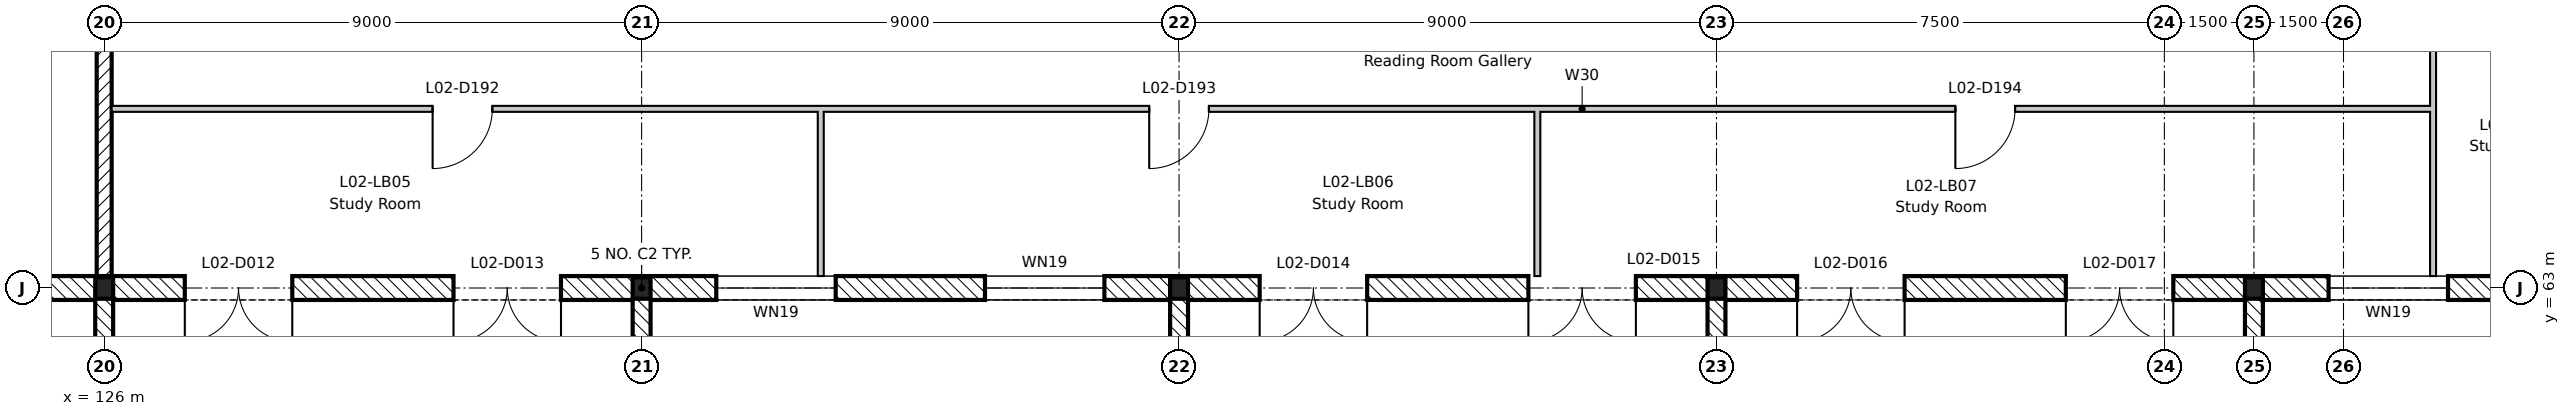
"""IFC4 building model, lengths in metres.
Left out: names, types, materials, properties, quantities, classifications, styles, units other than length and angle.
Written with IfcOpenShell. Run it as: python <this file> out.ifc"""

import sys

from ifc_helpers import new_model, si_unit, direction, frame, frame_2d, origin, origin_2d, place, context, subcontext, project, spatial, rectangle, i_section, extrude, element, fill, save


model = new_model("IFC4")
c1 = context("Model", 3, precision=1e-05, world=origin(), true_north=direction((0.0, 1.0)))
c2 = subcontext(c1, "Body", "Model", "MODEL_VIEW")
j1 = project(units=[si_unit("LENGTHUNIT", "METRE"), si_unit("PLANEANGLEUNIT", "RADIAN")], contexts=[c1])
p1 = place(None, origin())
s1 = spatial("IfcSite", under=j1, at=p1, CompositionType="ELEMENT")
p2 = place(p1, origin())
s2 = spatial("IfcBuilding", under=s1, at=p2, CompositionType="ELEMENT")
p3 = place(p2, frame((0.0, 0.0, 9.9)))
s3 = spatial("IfcBuildingStorey", under=s2, at=p3, CompositionType="ELEMENT", Elevation=9.9)
for number, where, z_axis, x_axis in (
    (1, (126.0, 63.0, -0.2), (0.0, 0.0, 1.0), (1.0, 0.0, 0.0)),
    (2, (135.0, 63.0, -0.2), (0.0, 0.0, 1.0), (1.0, 0.0, 0.0)),
    (3, (144.0, 63.0, -0.2), (0.0, 0.0, 1.0), (1.0, 0.0, 0.0)),
    (4, (153.0, 63.0, -0.2), (0.0, 0.0, 1.0), (1.0, 0.0, 0.0)),
    (5, (162.0, 63.0, -0.2), (0.0, 0.0, 1.0), (1.0, 0.0, 0.0)),
):
    element("IfcColumn", number, at=place(p3, frame(where, z_axis=z_axis, x_axis=x_axis)), inside=s3, PredefinedType="COLUMN", context=c2, shape_type="SweptSolid", body=[
        extrude(i_section(OverallWidth=0.3, OverallDepth=0.36, WebThickness=0.012, FlangeThickness=0.022, FilletRadius=0.027, at=origin_2d()), origin(), (0.0, 0.0, 1.0), 4.45),
    ])
p4 = place(p3, frame((126.0, 63.2, 0.0), z_axis=(0.0, 0.0, 1.0), x_axis=(0.0, 1.0, 0.0)))
e6 = element("IfcWall", 6, at=p4, inside=s3, PredefinedType="SHEAR", context=c2, shape_type="SweptSolid", body=[
    extrude(rectangle(XDim=8.65, YDim=0.25, at=frame_2d((4.325, 0.0))), origin(), (0.0, 0.0, 1.0), 4.25),
])
p5 = place(p4, frame((6.7, 0.0, 0.0)))
e7 = element("IfcOpeningElement", 7, at=p5, cuts=e6, PredefinedType="OPENING", context=c2, shape_type="SweptSolid", body=[
    extrude(rectangle(XDim=1.2, YDim=2.1, at=frame_2d((0.6, 1.05))), frame((0.0, 0.135, 0.0), z_axis=(0.0, -1.0, 0.0), x_axis=(1.0, 0.0, 0.0)), (0.0, 0.0, 1.0), 0.27),
])
for number, where, z_axis, x_axis in (
    (8, (126.0, 62.82, 0.0), (0.0, 0.0, 1.0), (0.0, -1.0, 0.0)),
    (9, (135.0, 62.82, 0.0), (0.0, 0.0, 1.0), (0.0, -1.0, 0.0)),
    (10, (144.0, 62.82, 0.0), (0.0, 0.0, 1.0), (0.0, -1.0, 0.0)),
    (11, (153.0, 62.82, 0.0), (0.0, 0.0, 1.0), (0.0, -1.0, 0.0)),
    (12, (162.0, 62.82, 0.0), (0.0, 0.0, 1.0), (0.0, -1.0, 0.0)),
):
    element("IfcWall", number, at=place(p3, frame(where, z_axis=z_axis, x_axis=x_axis)), inside=s3, PredefinedType="STANDARD", context=c2, shape_type="SweptSolid", body=[
        extrude(rectangle(XDim=2.82, YDim=0.3, at=frame_2d((1.41, 0.0))), origin(), (0.0, 0.0, 1.0), 3.97),
    ])
p6 = place(p3, frame((116.8, 63.0, 0.0), z_axis=(0.0, 0.0, 1.0), x_axis=(1.0, 0.0, 0.0)))
e13 = element("IfcWall", 13, at=p6, inside=s3, PredefinedType="STANDARD", context=c2, shape_type="SweptSolid", body=[
    extrude(rectangle(XDim=54.4, YDim=0.4, at=frame_2d((27.2, 0.0))), origin(), (0.0, 0.0, 1.0), 4.25),
])
p7 = place(p6, frame((19.45, 0.0, 0.5)))
e14 = element("IfcOpeningElement", 14, at=p7, cuts=e13, PredefinedType="OPENING", context=c2, shape_type="SweptSolid", body=[
    extrude(rectangle(XDim=2.0, YDim=3.2, at=frame_2d((1.0, 1.6))), frame((0.0, 0.21, 0.0), z_axis=(0.0, -1.0, 0.0), x_axis=(1.0, 0.0, 0.0)), (0.0, 0.0, 1.0), 0.42),
])
p8 = place(p6, frame((23.95, 0.0, 0.5)))
e15 = element("IfcOpeningElement", 15, at=p8, cuts=e13, PredefinedType="OPENING", context=c2, shape_type="SweptSolid", body=[
    extrude(rectangle(XDim=2.0, YDim=3.2, at=frame_2d((1.0, 1.6))), frame((0.0, 0.21, 0.0), z_axis=(0.0, -1.0, 0.0), x_axis=(1.0, 0.0, 0.0)), (0.0, 0.0, 1.0), 0.42),
])
p9 = place(p6, frame((46.45, 0.0, 0.5)))
e16 = element("IfcOpeningElement", 16, at=p9, cuts=e13, PredefinedType="OPENING", context=c2, shape_type="SweptSolid", body=[
    extrude(rectangle(XDim=2.0, YDim=3.2, at=frame_2d((1.0, 1.6))), frame((0.0, 0.21, 0.0), z_axis=(0.0, -1.0, 0.0), x_axis=(1.0, 0.0, 0.0)), (0.0, 0.0, 1.0), 0.42),
])
p10 = place(p6, frame((50.95, 0.0, 0.5)))
e17 = element("IfcOpeningElement", 17, at=p10, cuts=e13, PredefinedType="OPENING", context=c2, shape_type="SweptSolid", body=[
    extrude(rectangle(XDim=2.0, YDim=3.2, at=frame_2d((1.0, 1.6))), frame((0.0, 0.21, 0.0), z_axis=(0.0, -1.0, 0.0), x_axis=(1.0, 0.0, 0.0)), (0.0, 0.0, 1.0), 0.42),
])
p11 = place(p6, frame((10.55, 0.0, 0.0)))
e18 = element("IfcOpeningElement", 18, at=p11, cuts=e13, PredefinedType="OPENING", context=c2, shape_type="SweptSolid", body=[
    extrude(rectangle(XDim=1.8, YDim=2.4, at=frame_2d((0.9, 1.2))), frame((0.0, 0.21, 0.0), z_axis=(0.0, -1.0, 0.0), x_axis=(1.0, 0.0, 0.0)), (0.0, 0.0, 1.0), 0.42),
])
p12 = place(p6, frame((15.05, 0.0, 0.0)))
e19 = element("IfcOpeningElement", 19, at=p12, cuts=e13, PredefinedType="OPENING", context=c2, shape_type="SweptSolid", body=[
    extrude(rectangle(XDim=1.8, YDim=2.4, at=frame_2d((0.9, 1.2))), frame((0.0, 0.21, 0.0), z_axis=(0.0, -1.0, 0.0), x_axis=(1.0, 0.0, 0.0)), (0.0, 0.0, 1.0), 0.42),
])
p13 = place(p6, frame((28.55, 0.0, 0.0)))
e20 = element("IfcOpeningElement", 20, at=p13, cuts=e13, PredefinedType="OPENING", context=c2, shape_type="SweptSolid", body=[
    extrude(rectangle(XDim=1.8, YDim=2.4, at=frame_2d((0.9, 1.2))), frame((0.0, 0.21, 0.0), z_axis=(0.0, -1.0, 0.0), x_axis=(1.0, 0.0, 0.0)), (0.0, 0.0, 1.0), 0.42),
])
p14 = place(p6, frame((33.05, 0.0, 0.0)))
e21 = element("IfcOpeningElement", 21, at=p14, cuts=e13, PredefinedType="OPENING", context=c2, shape_type="SweptSolid", body=[
    extrude(rectangle(XDim=1.8, YDim=2.4, at=frame_2d((0.9, 1.2))), frame((0.0, 0.21, 0.0), z_axis=(0.0, -1.0, 0.0), x_axis=(1.0, 0.0, 0.0)), (0.0, 0.0, 1.0), 0.42),
])
p15 = place(p6, frame((37.55, 0.0, 0.0)))
e22 = element("IfcOpeningElement", 22, at=p15, cuts=e13, PredefinedType="OPENING", context=c2, shape_type="SweptSolid", body=[
    extrude(rectangle(XDim=1.8, YDim=2.4, at=frame_2d((0.9, 1.2))), frame((0.0, 0.21, 0.0), z_axis=(0.0, -1.0, 0.0), x_axis=(1.0, 0.0, 0.0)), (0.0, 0.0, 1.0), 0.42),
])
p16 = place(p6, frame((42.05, 0.0, 0.0)))
e23 = element("IfcOpeningElement", 23, at=p16, cuts=e13, PredefinedType="OPENING", context=c2, shape_type="SweptSolid", body=[
    extrude(rectangle(XDim=1.8, YDim=2.4, at=frame_2d((0.9, 1.2))), frame((0.0, 0.21, 0.0), z_axis=(0.0, -1.0, 0.0), x_axis=(1.0, 0.0, 0.0)), (0.0, 0.0, 1.0), 0.42),
])
p17 = place(p3, frame((126.125, 66.0, 0.0), z_axis=(0.0, 0.0, 1.0), x_axis=(1.0, 0.0, 0.0)))
e24 = element("IfcWall", 24, at=p17, inside=s3, PredefinedType="PARTITIONING", context=c2, shape_type="SweptSolid", body=[
    extrude(rectangle(XDim=38.825, YDim=0.1, at=frame_2d((19.413, 0.0))), origin(), (0.0, 0.0, 1.0), 4.25),
])
p18 = place(p17, frame((5.375, 0.0, 0.0)))
e25 = element("IfcOpeningElement", 25, at=p18, cuts=e24, PredefinedType="OPENING", context=c2, shape_type="SweptSolid", body=[
    extrude(rectangle(XDim=1.0, YDim=2.1, at=frame_2d((0.5, 1.05))), frame((0.0, 0.06, 0.0), z_axis=(0.0, -1.0, 0.0), x_axis=(1.0, 0.0, 0.0)), (0.0, 0.0, 1.0), 0.12),
])
p19 = place(p17, frame((17.375, 0.0, 0.0)))
e26 = element("IfcOpeningElement", 26, at=p19, cuts=e24, PredefinedType="OPENING", context=c2, shape_type="SweptSolid", body=[
    extrude(rectangle(XDim=1.0, YDim=2.1, at=frame_2d((0.5, 1.05))), frame((0.0, 0.06, 0.0), z_axis=(0.0, -1.0, 0.0), x_axis=(1.0, 0.0, 0.0)), (0.0, 0.0, 1.0), 0.12),
])
p20 = place(p17, frame((30.875, 0.0, 0.0)))
e27 = element("IfcOpeningElement", 27, at=p20, cuts=e24, PredefinedType="OPENING", context=c2, shape_type="SweptSolid", body=[
    extrude(rectangle(XDim=1.0, YDim=2.1, at=frame_2d((0.5, 1.05))), frame((0.0, 0.06, 0.0), z_axis=(0.0, -1.0, 0.0), x_axis=(1.0, 0.0, 0.0)), (0.0, 0.0, 1.0), 0.12),
])
for number, where, z_axis, x_axis in (
    (28, (138.0, 63.2, 0.0), (0.0, 0.0, 1.0), (0.0, 1.0, 0.0)),
    (29, (150.0, 63.2, 0.0), (0.0, 0.0, 1.0), (0.0, 1.0, 0.0)),
):
    element("IfcWall", number, at=place(p3, frame(where, z_axis=z_axis, x_axis=x_axis)), inside=s3, PredefinedType="PARTITIONING", context=c2, shape_type="SweptSolid", body=[
        extrude(rectangle(XDim=2.75, YDim=0.1, at=frame_2d((1.375, 0.0))), origin(), (0.0, 0.0, 1.0), 4.25),
    ])
p21 = place(p3, frame((165.0, 63.2, 0.0), z_axis=(0.0, 0.0, 1.0), x_axis=(0.0, 1.0, 0.0)))
e30 = element("IfcWall", 30, at=p21, inside=s3, PredefinedType="PARTITIONING", context=c2, shape_type="SweptSolid", body=[
    extrude(rectangle(XDim=5.725, YDim=0.1, at=frame_2d((2.863, 0.0))), origin(), (0.0, 0.0, 1.0), 4.25),
])
p22 = place(p21, frame((3.8, 0.0, 0.0)))
e31 = element("IfcOpeningElement", 31, at=p22, cuts=e30, PredefinedType="OPENING", context=c2, shape_type="SweptSolid", body=[
    extrude(rectangle(XDim=1.0, YDim=2.1, at=frame_2d((0.5, 1.05))), frame((0.0, 0.06, 0.0), z_axis=(0.0, -1.0, 0.0), x_axis=(1.0, 0.0, 0.0)), (0.0, 0.0, 1.0), 0.12),
])
p23 = place(p7, origin())
e32 = element("IfcWindow", 32, at=p23, inside=s3, PartitioningType="SINGLE_PANEL", PredefinedType="WINDOW", context=c2, shape_type="SweptSolid", body=[
    extrude(rectangle(XDim=2.0, YDim=3.2, at=frame_2d((1.0, 1.6))), frame((0.0, 0.03, 0.0), z_axis=(0.0, -1.0, 0.0), x_axis=(1.0, 0.0, 0.0)), (0.0, 0.0, 1.0), 0.06),
])
fill(e14, e32)
p24 = place(p8, origin())
e33 = element("IfcWindow", 33, at=p24, inside=s3, PartitioningType="SINGLE_PANEL", PredefinedType="WINDOW", context=c2, shape_type="SweptSolid", body=[
    extrude(rectangle(XDim=2.0, YDim=3.2, at=frame_2d((1.0, 1.6))), frame((0.0, 0.03, 0.0), z_axis=(0.0, -1.0, 0.0), x_axis=(1.0, 0.0, 0.0)), (0.0, 0.0, 1.0), 0.06),
])
fill(e15, e33)
p25 = place(p9, origin())
e34 = element("IfcWindow", 34, at=p25, inside=s3, PartitioningType="SINGLE_PANEL", PredefinedType="WINDOW", context=c2, shape_type="SweptSolid", body=[
    extrude(rectangle(XDim=2.0, YDim=3.2, at=frame_2d((1.0, 1.6))), frame((0.0, 0.03, 0.0), z_axis=(0.0, -1.0, 0.0), x_axis=(1.0, 0.0, 0.0)), (0.0, 0.0, 1.0), 0.06),
])
fill(e16, e34)
p26 = place(p11, frame((1.8, 0.0, 0.0), z_axis=(0.0, 0.0, 1.0), x_axis=(-1.0, 0.0, 0.0)))
e35 = element("IfcDoor", 35, at=p26, inside=s3, OperationType="DOUBLE_DOOR_SINGLE_SWING", PredefinedType="DOOR", context=c2, shape_type="SweptSolid", body=[
    extrude(rectangle(XDim=1.8, YDim=2.4, at=frame_2d((0.9, 1.2))), frame((0.0, 0.025, 0.0), z_axis=(0.0, -1.0, 0.0), x_axis=(1.0, 0.0, 0.0)), (0.0, 0.0, 1.0), 0.05),
])
fill(e18, e35)
p27 = place(p12, frame((1.8, 0.0, 0.0), z_axis=(0.0, 0.0, 1.0), x_axis=(-1.0, 0.0, 0.0)))
e36 = element("IfcDoor", 36, at=p27, inside=s3, OperationType="DOUBLE_DOOR_SINGLE_SWING", PredefinedType="DOOR", context=c2, shape_type="SweptSolid", body=[
    extrude(rectangle(XDim=1.8, YDim=2.4, at=frame_2d((0.9, 1.2))), frame((0.0, 0.025, 0.0), z_axis=(0.0, -1.0, 0.0), x_axis=(1.0, 0.0, 0.0)), (0.0, 0.0, 1.0), 0.05),
])
fill(e19, e36)
p28 = place(p13, frame((1.8, 0.0, 0.0), z_axis=(0.0, 0.0, 1.0), x_axis=(-1.0, 0.0, 0.0)))
e37 = element("IfcDoor", 37, at=p28, inside=s3, OperationType="DOUBLE_DOOR_SINGLE_SWING", PredefinedType="DOOR", context=c2, shape_type="SweptSolid", body=[
    extrude(rectangle(XDim=1.8, YDim=2.4, at=frame_2d((0.9, 1.2))), frame((0.0, 0.025, 0.0), z_axis=(0.0, -1.0, 0.0), x_axis=(1.0, 0.0, 0.0)), (0.0, 0.0, 1.0), 0.05),
])
fill(e20, e37)
p29 = place(p14, frame((1.8, 0.0, 0.0), z_axis=(0.0, 0.0, 1.0), x_axis=(-1.0, 0.0, 0.0)))
e38 = element("IfcDoor", 38, at=p29, inside=s3, OperationType="DOUBLE_DOOR_SINGLE_SWING", PredefinedType="DOOR", context=c2, shape_type="SweptSolid", body=[
    extrude(rectangle(XDim=1.8, YDim=2.4, at=frame_2d((0.9, 1.2))), frame((0.0, 0.025, 0.0), z_axis=(0.0, -1.0, 0.0), x_axis=(1.0, 0.0, 0.0)), (0.0, 0.0, 1.0), 0.05),
])
fill(e21, e38)
p30 = place(p15, frame((1.8, 0.0, 0.0), z_axis=(0.0, 0.0, 1.0), x_axis=(-1.0, 0.0, 0.0)))
e39 = element("IfcDoor", 39, at=p30, inside=s3, OperationType="DOUBLE_DOOR_SINGLE_SWING", PredefinedType="DOOR", context=c2, shape_type="SweptSolid", body=[
    extrude(rectangle(XDim=1.8, YDim=2.4, at=frame_2d((0.9, 1.2))), frame((0.0, 0.025, 0.0), z_axis=(0.0, -1.0, 0.0), x_axis=(1.0, 0.0, 0.0)), (0.0, 0.0, 1.0), 0.05),
])
fill(e22, e39)
p31 = place(p16, frame((1.8, 0.0, 0.0), z_axis=(0.0, 0.0, 1.0), x_axis=(-1.0, 0.0, 0.0)))
e40 = element("IfcDoor", 40, at=p31, inside=s3, OperationType="DOUBLE_DOOR_SINGLE_SWING", PredefinedType="DOOR", context=c2, shape_type="SweptSolid", body=[
    extrude(rectangle(XDim=1.8, YDim=2.4, at=frame_2d((0.9, 1.2))), frame((0.0, 0.025, 0.0), z_axis=(0.0, -1.0, 0.0), x_axis=(1.0, 0.0, 0.0)), (0.0, 0.0, 1.0), 0.05),
])
fill(e23, e40)
p32 = place(p18, frame((1.0, 0.0, 0.0), z_axis=(0.0, 0.0, 1.0), x_axis=(-1.0, 0.0, 0.0)))
e41 = element("IfcDoor", 41, at=p32, inside=s3, OperationType="SINGLE_SWING_RIGHT", PredefinedType="DOOR", context=c2, shape_type="SweptSolid", body=[
    extrude(rectangle(XDim=1.0, YDim=2.1, at=frame_2d((0.5, 1.05))), frame((0.0, 0.025, 0.0), z_axis=(0.0, -1.0, 0.0), x_axis=(1.0, 0.0, 0.0)), (0.0, 0.0, 1.0), 0.05),
])
fill(e25, e41)
p33 = place(p19, frame((1.0, 0.0, 0.0), z_axis=(0.0, 0.0, 1.0), x_axis=(-1.0, 0.0, 0.0)))
e42 = element("IfcDoor", 42, at=p33, inside=s3, OperationType="SINGLE_SWING_RIGHT", PredefinedType="DOOR", context=c2, shape_type="SweptSolid", body=[
    extrude(rectangle(XDim=1.0, YDim=2.1, at=frame_2d((0.5, 1.05))), frame((0.0, 0.025, 0.0), z_axis=(0.0, -1.0, 0.0), x_axis=(1.0, 0.0, 0.0)), (0.0, 0.0, 1.0), 0.05),
])
fill(e26, e42)
p34 = place(p20, frame((1.0, 0.0, 0.0), z_axis=(0.0, 0.0, 1.0), x_axis=(-1.0, 0.0, 0.0)))
e43 = element("IfcDoor", 43, at=p34, inside=s3, OperationType="SINGLE_SWING_RIGHT", PredefinedType="DOOR", context=c2, shape_type="SweptSolid", body=[
    extrude(rectangle(XDim=1.0, YDim=2.1, at=frame_2d((0.5, 1.05))), frame((0.0, 0.025, 0.0), z_axis=(0.0, -1.0, 0.0), x_axis=(1.0, 0.0, 0.0)), (0.0, 0.0, 1.0), 0.05),
])
fill(e27, e43)
save(model, sys.argv[1])
